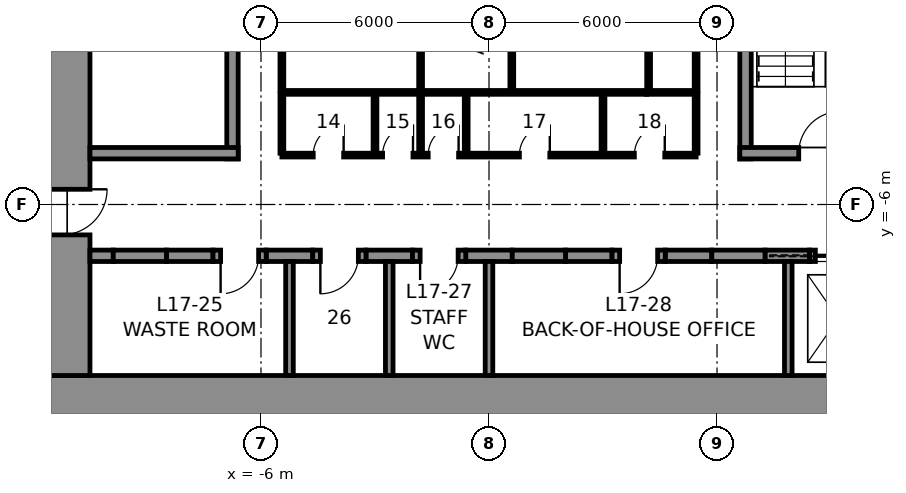
"""IFC4 building model, lengths in metres.
Left out: names, types, materials, properties, quantities, classifications, styles, units other than length and angle.
Written with IfcOpenShell. Run it as: python <this file> out.ifc"""

import sys

from ifc_helpers import new_model, si_unit, direction, frame, frame_2d, origin, place, context, subcontext, project, spatial, rectangle, extrude, element, fill, save


model = new_model("IFC4")
c1 = context("Model", 3, precision=1e-05, world=origin(), true_north=direction((0.0, 1.0)))
c2 = subcontext(c1, "Body", "Model", "MODEL_VIEW")
j1 = project(units=[si_unit("LENGTHUNIT", "METRE"), si_unit("PLANEANGLEUNIT", "RADIAN")], contexts=[c1])
p1 = place(None, origin())
s1 = spatial("IfcSite", under=j1, at=p1, CompositionType="ELEMENT")
p2 = place(p1, origin())
s2 = spatial("IfcBuilding", under=s1, at=p2, CompositionType="ELEMENT")
p3 = place(p2, frame((0.0, 0.0, 90.6)))
s3 = spatial("IfcBuildingStorey", under=s2, at=p3, CompositionType="ELEMENT", Elevation=90.6)
p4 = place(p3, frame((12.0, -11.25, 0.0), z_axis=(0.0, 0.0, 1.0), x_axis=(-1.0, 0.0, 0.0)))
e1 = element("IfcWall", 1, at=p4, inside=s3, PredefinedType="SHEAR", context=c2, shape_type="SweptSolid", body=[
    extrude(rectangle(XDim=24.0, YDim=1.5, at=frame_2d((12.0, 0.0))), origin(), (0.0, 0.0, 1.0), 4.6),
])
p5 = place(p3, frame((-11.25, -10.5, 0.0), z_axis=(0.0, 0.0, 1.0), x_axis=(0.0, 1.0, 0.0)))
e2 = element("IfcWall", 2, at=p5, inside=s3, PredefinedType="SHEAR", context=c2, shape_type="SweptSolid", body=[
    extrude(rectangle(XDim=21.0, YDim=1.5, at=frame_2d((10.5, 0.0))), origin(), (0.0, 0.0, 1.0), 4.6),
])
p6 = place(p5, frame((16.1, 0.0, 0.0)))
e3 = element("IfcOpeningElement", 3, at=p6, cuts=e2, PredefinedType="OPENING", context=c2, shape_type="SweptSolid", body=[
    extrude(rectangle(XDim=1.2, YDim=2.3, at=frame_2d((0.6, 1.15))), frame((0.0, 0.76, 0.0), z_axis=(0.0, -1.0, 0.0), x_axis=(1.0, 0.0, 0.0)), (0.0, 0.0, 1.0), 1.52),
])
p7 = place(p5, frame((3.7, 0.0, 0.0)))
e4 = element("IfcOpeningElement", 4, at=p7, cuts=e2, PredefinedType="OPENING", context=c2, shape_type="SweptSolid", body=[
    extrude(rectangle(XDim=1.2, YDim=2.3, at=frame_2d((0.6, 1.15))), frame((0.0, 0.76, 0.0), z_axis=(0.0, -1.0, 0.0), x_axis=(1.0, 0.0, 0.0)), (0.0, 0.0, 1.0), 1.52),
])
p8 = place(p3, frame((-10.5, -7.35, 0.0), z_axis=(0.0, 0.0, 1.0), x_axis=(1.0, 0.0, 0.0)))
e5 = element("IfcWall", 5, at=p8, inside=s3, PredefinedType="SHEAR", context=c2, shape_type="SweptSolid", body=[
    extrude(rectangle(XDim=0.613, YDim=0.3, at=frame_2d((0.306, 0.0))), origin(), (0.0, 0.0, 1.0), 4.6),
])
for number, where, z_axis, x_axis in (
    (6, (-8.488, -7.35, 0.0), (0.0, 0.0, 1.0), (1.0, 0.0, 0.0)),
    (7, (-5.863, -7.35, 0.0), (0.0, 0.0, 1.0), (1.0, 0.0, 0.0)),
    (8, (-3.238, -7.35, 0.0), (0.0, 0.0, 1.0), (1.0, 0.0, 0.0)),
    (9, (-0.613, -7.35, 0.0), (0.0, 0.0, 1.0), (1.0, 0.0, 0.0)),
    (10, (2.012, -7.35, 0.0), (0.0, 0.0, 1.0), (1.0, 0.0, 0.0)),
    (11, (4.637, -7.35, 0.0), (0.0, 0.0, 1.0), (1.0, 0.0, 0.0)),
):
    element("IfcWall", number, at=place(p3, frame(where, z_axis=z_axis, x_axis=x_axis)), inside=s3, PredefinedType="SHEAR", context=c2, shape_type="SweptSolid", body=[
        extrude(rectangle(XDim=1.225, YDim=0.3, at=frame_2d((0.613, 0.0))), origin(), (0.0, 0.0, 1.0), 4.6),
    ])
p9 = place(p3, frame((7.262, -7.35, 0.0), z_axis=(0.0, 0.0, 1.0), x_axis=(1.0, 0.0, 0.0)))
e12 = element("IfcWall", 12, at=p9, inside=s3, PredefinedType="SHEAR", context=c2, shape_type="SweptSolid", body=[
    extrude(rectangle(XDim=1.175, YDim=0.3, at=frame_2d((0.587, 0.0))), origin(), (0.0, 0.0, 1.0), 4.6),
])
p10 = place(p3, frame((-9.887, -7.35, 0.0), z_axis=(0.0, 0.0, 1.0), x_axis=(1.0, 0.0, 0.0)))
e13 = element("IfcWall", 13, at=p10, inside=s3, PredefinedType="PARTITIONING", context=c2, shape_type="SweptSolid", body=[
    extrude(rectangle(XDim=1.4, YDim=0.3, at=frame_2d((0.7, 0.0))), origin(), (0.0, 0.0, 1.0), 4.6),
])
p11 = place(p3, frame((-7.262, -7.35, 0.0), z_axis=(0.0, 0.0, 1.0), x_axis=(1.0, 0.0, 0.0)))
e14 = element("IfcWall", 14, at=p11, inside=s3, PredefinedType="PARTITIONING", context=c2, shape_type="SweptSolid", body=[
    extrude(rectangle(XDim=1.4, YDim=0.3, at=frame_2d((0.7, 0.0))), origin(), (0.0, 0.0, 1.0), 4.6),
])
p12 = place(p11, frame((0.2, 0.0, 0.0)))
e15 = element("IfcOpeningElement", 15, at=p12, cuts=e14, PredefinedType="OPENING", context=c2, shape_type="SweptSolid", body=[
    extrude(rectangle(XDim=1.0, YDim=2.3, at=frame_2d((0.5, 1.15))), frame((0.0, 0.16, 0.0), z_axis=(0.0, -1.0, 0.0), x_axis=(1.0, 0.0, 0.0)), (0.0, 0.0, 1.0), 0.32),
])
p13 = place(p3, frame((-4.637, -7.35, 0.0), z_axis=(0.0, 0.0, 1.0), x_axis=(1.0, 0.0, 0.0)))
e16 = element("IfcWall", 16, at=p13, inside=s3, PredefinedType="PARTITIONING", context=c2, shape_type="SweptSolid", body=[
    extrude(rectangle(XDim=1.4, YDim=0.3, at=frame_2d((0.7, 0.0))), origin(), (0.0, 0.0, 1.0), 4.6),
])
p14 = place(p13, frame((0.2, 0.0, 0.0)))
e17 = element("IfcOpeningElement", 17, at=p14, cuts=e16, PredefinedType="OPENING", context=c2, shape_type="SweptSolid", body=[
    extrude(rectangle(XDim=1.0, YDim=2.3, at=frame_2d((0.5, 1.15))), frame((0.0, 0.16, 0.0), z_axis=(0.0, -1.0, 0.0), x_axis=(1.0, 0.0, 0.0)), (0.0, 0.0, 1.0), 0.32),
])
p15 = place(p3, frame((-2.012, -7.35, 0.0), z_axis=(0.0, 0.0, 1.0), x_axis=(1.0, 0.0, 0.0)))
e18 = element("IfcWall", 18, at=p15, inside=s3, PredefinedType="PARTITIONING", context=c2, shape_type="SweptSolid", body=[
    extrude(rectangle(XDim=1.4, YDim=0.3, at=frame_2d((0.7, 0.0))), origin(), (0.0, 0.0, 1.0), 4.6),
])
p16 = place(p15, frame((0.2, 0.0, 0.0)))
e19 = element("IfcOpeningElement", 19, at=p16, cuts=e18, PredefinedType="OPENING", context=c2, shape_type="SweptSolid", body=[
    extrude(rectangle(XDim=1.0, YDim=2.3, at=frame_2d((0.5, 1.15))), frame((0.0, 0.16, 0.0), z_axis=(0.0, -1.0, 0.0), x_axis=(1.0, 0.0, 0.0)), (0.0, 0.0, 1.0), 0.32),
])
p17 = place(p3, frame((0.613, -7.35, 0.0), z_axis=(0.0, 0.0, 1.0), x_axis=(1.0, 0.0, 0.0)))
e20 = element("IfcWall", 20, at=p17, inside=s3, PredefinedType="PARTITIONING", context=c2, shape_type="SweptSolid", body=[
    extrude(rectangle(XDim=1.4, YDim=0.3, at=frame_2d((0.7, 0.0))), origin(), (0.0, 0.0, 1.0), 4.6),
])
p18 = place(p3, frame((3.238, -7.35, 0.0), z_axis=(0.0, 0.0, 1.0), x_axis=(1.0, 0.0, 0.0)))
e21 = element("IfcWall", 21, at=p18, inside=s3, PredefinedType="PARTITIONING", context=c2, shape_type="SweptSolid", body=[
    extrude(rectangle(XDim=1.4, YDim=0.3, at=frame_2d((0.7, 0.0))), origin(), (0.0, 0.0, 1.0), 4.6),
])
p19 = place(p18, frame((0.2, 0.0, 0.0)))
e22 = element("IfcOpeningElement", 22, at=p19, cuts=e21, PredefinedType="OPENING", context=c2, shape_type="SweptSolid", body=[
    extrude(rectangle(XDim=1.0, YDim=2.3, at=frame_2d((0.5, 1.15))), frame((0.0, 0.16, 0.0), z_axis=(0.0, -1.0, 0.0), x_axis=(1.0, 0.0, 0.0)), (0.0, 0.0, 1.0), 0.32),
])
p20 = place(p3, frame((5.863, -7.35, 0.0), z_axis=(0.0, 0.0, 1.0), x_axis=(1.0, 0.0, 0.0)))
e23 = element("IfcWall", 23, at=p20, inside=s3, PredefinedType="PARTITIONING", context=c2, shape_type="SweptSolid", body=[
    extrude(rectangle(XDim=1.4, YDim=0.3, at=frame_2d((0.7, 0.0))), origin(), (0.0, 0.0, 1.0), 4.6),
])
p21 = place(p3, frame((8.438, -7.35, 0.0), z_axis=(0.0, 0.0, 1.0), x_axis=(1.0, 0.0, 0.0)))
e24 = element("IfcWall", 24, at=p21, inside=s3, PredefinedType="PARTITIONING", context=c2, shape_type="SweptSolid", body=[
    extrude(rectangle(XDim=1.5, YDim=0.3, at=frame_2d((0.75, 0.0))), origin(), (0.0, 0.0, 1.0), 4.6),
])
p22 = place(p21, frame((0.15, 0.0, 0.0)))
e25 = element("IfcOpeningElement", 25, at=p22, cuts=e24, PredefinedType="OPENING", context=c2, shape_type="SweptSolid", body=[
    extrude(rectangle(XDim=1.2, YDim=2.3, at=frame_2d((0.6, 1.15))), frame((0.0, 0.16, 0.0), z_axis=(0.0, -1.0, 0.0), x_axis=(1.0, 0.0, 0.0)), (0.0, 0.0, 1.0), 0.32),
])
for number, where, z_axis, x_axis in (
    (26, (-5.25, -10.5, 0.0), (0.0, 0.0, 1.0), (0.0, 1.0, 0.0)),
    (27, (-2.625, -10.5, 0.0), (0.0, 0.0, 1.0), (0.0, 1.0, 0.0)),
    (28, (0.0, -10.5, 0.0), (0.0, 0.0, 1.0), (0.0, 1.0, 0.0)),
    (29, (7.875, -10.5, 0.0), (0.0, 0.0, 1.0), (0.0, 1.0, 0.0)),
):
    element("IfcWall", number, at=place(p3, frame(where, z_axis=z_axis, x_axis=x_axis)), inside=s3, PredefinedType="PARTITIONING", context=c2, shape_type="SweptSolid", body=[
        extrude(rectangle(XDim=3.0, YDim=0.2, at=frame_2d((1.5, 0.0))), origin(), (0.0, 0.0, 1.0), 4.6),
    ])
p23 = place(p3, frame((-6.75, -4.8, 0.0), z_axis=(0.0, 0.0, 1.0), x_axis=(0.0, 1.0, 0.0)))
e30 = element("IfcWall", 30, at=p23, inside=s3, PredefinedType="SOLIDWALL", context=c2, shape_type="SweptSolid", body=[
    extrude(rectangle(XDim=9.6, YDim=0.3, at=frame_2d((4.8, 0.0))), origin(), (0.0, 0.0, 1.0), 4.35),
])
p24 = place(p3, frame((-6.6, -4.65, 0.0), z_axis=(0.0, 0.0, 1.0), x_axis=(-1.0, 0.0, 0.0)))
e31 = element("IfcWall", 31, at=p24, inside=s3, PredefinedType="SOLIDWALL", context=c2, shape_type="SweptSolid", body=[
    extrude(rectangle(XDim=3.9, YDim=0.3, at=frame_2d((1.95, 0.0))), origin(), (0.0, 0.0, 1.0), 4.35),
])
p25 = place(p3, frame((6.75, -4.8, 0.0), z_axis=(0.0, 0.0, 1.0), x_axis=(0.0, 1.0, 0.0)))
e32 = element("IfcWall", 32, at=p25, inside=s3, PredefinedType="SOLIDWALL", context=c2, shape_type="SweptSolid", body=[
    extrude(rectangle(XDim=9.6, YDim=0.3, at=frame_2d((4.8, 0.0))), origin(), (0.0, 0.0, 1.0), 4.35),
])
p26 = place(p3, frame((10.5, -4.65, 0.0), z_axis=(0.0, 0.0, 1.0), x_axis=(-1.0, 0.0, 0.0)))
e33 = element("IfcWall", 33, at=p26, inside=s3, PredefinedType="SOLIDWALL", context=c2, shape_type="SweptSolid", body=[
    extrude(rectangle(XDim=3.9, YDim=0.3, at=frame_2d((1.95, 0.0))), origin(), (0.0, 0.0, 1.0), 4.35),
])
p27 = place(p26, frame((1.25, 0.0, 0.0)))
e34 = element("IfcOpeningElement", 34, at=p27, cuts=e33, PredefinedType="OPENING", context=c2, shape_type="SweptSolid", body=[
    extrude(rectangle(XDim=1.1, YDim=2.3, at=frame_2d((0.55, 1.15))), frame((0.0, 0.16, 0.0), z_axis=(0.0, -1.0, 0.0), x_axis=(1.0, 0.0, 0.0)), (0.0, 0.0, 1.0), 0.32),
])
p28 = place(p3, frame((4.15, -3.05, 0.0), z_axis=(0.0, 0.0, 1.0), x_axis=(-1.0, 0.0, 0.0)))
e35 = element("IfcWall", 35, at=p28, inside=s3, PredefinedType="PARTITIONING", context=c2, shape_type="SweptSolid", body=[
    extrude(rectangle(XDim=9.6, YDim=0.1, at=frame_2d((4.8, 0.0))), origin(), (0.0, 0.0, 1.0), 4.35),
])
p29 = place(p3, frame((5.45, -3.05, 0.0), z_axis=(0.0, 0.0, 1.0), x_axis=(-1.0, 0.0, 0.0)))
e36 = element("IfcWall", 36, at=p29, inside=s3, PredefinedType="PARTITIONING", context=c2, shape_type="SweptSolid", body=[
    extrude(rectangle(XDim=1.3, YDim=0.1, at=frame_2d((0.65, 0.0))), origin(), (0.0, 0.0, 1.0), 4.35),
])
for number, where, z_axis, x_axis in (
    (37, (5.45, 3.0, 0.0), (0.0, 0.0, 1.0), (0.0, -1.0, 0.0)),
    (38, (-5.45, -3.0, 0.0), (0.0, 0.0, 1.0), (0.0, 1.0, 0.0)),
    (39, (-1.8, -3.0, 0.0), (0.0, 0.0, 1.0), (0.0, 1.0, 0.0)),
    (40, (0.6, -3.0, 0.0), (0.0, 0.0, 1.0), (0.0, 1.0, 0.0)),
    (41, (4.2, -3.0, 0.0), (0.0, 0.0, 1.0), (0.0, 1.0, 0.0)),
):
    element("IfcWall", number, at=place(p3, frame(where, z_axis=z_axis, x_axis=x_axis)), inside=s3, PredefinedType="PARTITIONING", context=c2, shape_type="SweptSolid", body=[
        extrude(rectangle(XDim=6.0, YDim=0.1, at=frame_2d((3.0, 0.0))), origin(), (0.0, 0.0, 1.0), 4.35),
    ])
p30 = place(p3, frame((5.45, -4.7, 0.0), z_axis=(0.0, 0.0, 1.0), x_axis=(-1.0, 0.0, 0.0)))
e42 = element("IfcWall", 42, at=p30, inside=s3, PredefinedType="PARTITIONING", context=c2, shape_type="SweptSolid", body=[
    extrude(rectangle(XDim=10.9, YDim=0.1, at=frame_2d((5.45, 0.0))), origin(), (0.0, 0.0, 1.0), 4.35),
])
p31 = place(p30, frame((9.275, 0.0, 0.0)))
e43 = element("IfcOpeningElement", 43, at=p31, cuts=e42, PredefinedType="OPENING", context=c2, shape_type="SweptSolid", body=[
    extrude(rectangle(XDim=0.8, YDim=2.3, at=frame_2d((0.4, 1.15))), frame((0.0, 0.06, 0.0), z_axis=(0.0, -1.0, 0.0), x_axis=(1.0, 0.0, 0.0)), (0.0, 0.0, 1.0), 0.12),
])
p32 = place(p30, frame((7.45, 0.0, 0.0)))
e44 = element("IfcOpeningElement", 44, at=p32, cuts=e42, PredefinedType="OPENING", context=c2, shape_type="SweptSolid", body=[
    extrude(rectangle(XDim=0.8, YDim=2.3, at=frame_2d((0.4, 1.15))), frame((0.0, 0.06, 0.0), z_axis=(0.0, -1.0, 0.0), x_axis=(1.0, 0.0, 0.0)), (0.0, 0.0, 1.0), 0.12),
])
p33 = place(p30, frame((6.25, 0.0, 0.0)))
e45 = element("IfcOpeningElement", 45, at=p33, cuts=e42, PredefinedType="OPENING", context=c2, shape_type="SweptSolid", body=[
    extrude(rectangle(XDim=0.8, YDim=2.3, at=frame_2d((0.4, 1.15))), frame((0.0, 0.06, 0.0), z_axis=(0.0, -1.0, 0.0), x_axis=(1.0, 0.0, 0.0)), (0.0, 0.0, 1.0), 0.12),
])
p34 = place(p30, frame((3.85, 0.0, 0.0)))
e46 = element("IfcOpeningElement", 46, at=p34, cuts=e42, PredefinedType="OPENING", context=c2, shape_type="SweptSolid", body=[
    extrude(rectangle(XDim=0.8, YDim=2.3, at=frame_2d((0.4, 1.15))), frame((0.0, 0.06, 0.0), z_axis=(0.0, -1.0, 0.0), x_axis=(1.0, 0.0, 0.0)), (0.0, 0.0, 1.0), 0.12),
])
p35 = place(p30, frame((0.825, 0.0, 0.0)))
e47 = element("IfcOpeningElement", 47, at=p35, cuts=e42, PredefinedType="OPENING", context=c2, shape_type="SweptSolid", body=[
    extrude(rectangle(XDim=0.8, YDim=2.3, at=frame_2d((0.4, 1.15))), frame((0.0, 0.06, 0.0), z_axis=(0.0, -1.0, 0.0), x_axis=(1.0, 0.0, 0.0)), (0.0, 0.0, 1.0), 0.12),
])
for number, where, z_axis, x_axis in (
    (48, (-5.45, -3.1, 0.0), (0.0, 0.0, 1.0), (0.0, -1.0, 0.0)),
    (49, (5.45, -3.1, 0.0), (0.0, 0.0, 1.0), (0.0, -1.0, 0.0)),
    (50, (-3.0, -3.1, 0.0), (0.0, 0.0, 1.0), (0.0, -1.0, 0.0)),
    (51, (-1.8, -3.1, 0.0), (0.0, 0.0, 1.0), (0.0, -1.0, 0.0)),
    (52, (-0.6, -3.1, 0.0), (0.0, 0.0, 1.0), (0.0, -1.0, 0.0)),
    (53, (3.0, -3.1, 0.0), (0.0, 0.0, 1.0), (0.0, -1.0, 0.0)),
):
    element("IfcWall", number, at=place(p3, frame(where, z_axis=z_axis, x_axis=x_axis)), inside=s3, PredefinedType="PARTITIONING", context=c2, shape_type="SweptSolid", body=[
        extrude(rectangle(XDim=1.55, YDim=0.1, at=frame_2d((0.775, 0.0))), origin(), (0.0, 0.0, 1.0), 4.35),
    ])
p36 = place(p27, frame((1.1, 0.0, 0.0), z_axis=(0.0, 0.0, 1.0), x_axis=(-1.0, 0.0, 0.0)))
e54 = element("IfcDoor", 54, at=p36, inside=s3, OperationType="SINGLE_SWING_RIGHT", PredefinedType="DOOR", context=c2, shape_type="SweptSolid", body=[
    extrude(rectangle(XDim=1.1, YDim=2.3, at=frame_2d((0.55, 1.15))), frame((0.0, 0.025, 0.0), z_axis=(0.0, -1.0, 0.0), x_axis=(1.0, 0.0, 0.0)), (0.0, 0.0, 1.0), 0.05),
])
fill(e34, e54)
p37 = place(p31, frame((0.8, 0.0, 0.0), z_axis=(0.0, 0.0, 1.0), x_axis=(-1.0, 0.0, 0.0)))
e55 = element("IfcDoor", 55, at=p37, inside=s3, OperationType="SINGLE_SWING_RIGHT", PredefinedType="DOOR", context=c2, shape_type="SweptSolid", body=[
    extrude(rectangle(XDim=0.8, YDim=2.3, at=frame_2d((0.4, 1.15))), frame((0.0, 0.025, 0.0), z_axis=(0.0, -1.0, 0.0), x_axis=(1.0, 0.0, 0.0)), (0.0, 0.0, 1.0), 0.05),
])
fill(e43, e55)
p38 = place(p32, frame((0.8, 0.0, 0.0), z_axis=(0.0, 0.0, 1.0), x_axis=(-1.0, 0.0, 0.0)))
e56 = element("IfcDoor", 56, at=p38, inside=s3, OperationType="SINGLE_SWING_RIGHT", PredefinedType="DOOR", context=c2, shape_type="SweptSolid", body=[
    extrude(rectangle(XDim=0.8, YDim=2.3, at=frame_2d((0.4, 1.15))), frame((0.0, 0.025, 0.0), z_axis=(0.0, -1.0, 0.0), x_axis=(1.0, 0.0, 0.0)), (0.0, 0.0, 1.0), 0.05),
])
fill(e44, e56)
p39 = place(p33, frame((0.8, 0.0, 0.0), z_axis=(0.0, 0.0, 1.0), x_axis=(-1.0, 0.0, 0.0)))
e57 = element("IfcDoor", 57, at=p39, inside=s3, OperationType="SINGLE_SWING_RIGHT", PredefinedType="DOOR", context=c2, shape_type="SweptSolid", body=[
    extrude(rectangle(XDim=0.8, YDim=2.3, at=frame_2d((0.4, 1.15))), frame((0.0, 0.025, 0.0), z_axis=(0.0, -1.0, 0.0), x_axis=(1.0, 0.0, 0.0)), (0.0, 0.0, 1.0), 0.05),
])
fill(e45, e57)
p40 = place(p34, frame((0.8, 0.0, 0.0), z_axis=(0.0, 0.0, 1.0), x_axis=(-1.0, 0.0, 0.0)))
e58 = element("IfcDoor", 58, at=p40, inside=s3, OperationType="SINGLE_SWING_RIGHT", PredefinedType="DOOR", context=c2, shape_type="SweptSolid", body=[
    extrude(rectangle(XDim=0.8, YDim=2.3, at=frame_2d((0.4, 1.15))), frame((0.0, 0.025, 0.0), z_axis=(0.0, -1.0, 0.0), x_axis=(1.0, 0.0, 0.0)), (0.0, 0.0, 1.0), 0.05),
])
fill(e46, e58)
p41 = place(p35, frame((0.8, 0.0, 0.0), z_axis=(0.0, 0.0, 1.0), x_axis=(-1.0, 0.0, 0.0)))
e59 = element("IfcDoor", 59, at=p41, inside=s3, OperationType="SINGLE_SWING_RIGHT", PredefinedType="DOOR", context=c2, shape_type="SweptSolid", body=[
    extrude(rectangle(XDim=0.8, YDim=2.3, at=frame_2d((0.4, 1.15))), frame((0.0, 0.025, 0.0), z_axis=(0.0, -1.0, 0.0), x_axis=(1.0, 0.0, 0.0)), (0.0, 0.0, 1.0), 0.05),
])
fill(e47, e59)
p42 = place(p12, frame((1.0, 0.0, 0.0), z_axis=(0.0, 0.0, 1.0), x_axis=(-1.0, 0.0, 0.0)))
e60 = element("IfcDoor", 60, at=p42, inside=s3, OperationType="SINGLE_SWING_RIGHT", PredefinedType="DOOR", context=c2, shape_type="SweptSolid", body=[
    extrude(rectangle(XDim=1.0, YDim=2.3, at=frame_2d((0.5, 1.15))), frame((0.0, 0.025, 0.0), z_axis=(0.0, -1.0, 0.0), x_axis=(1.0, 0.0, 0.0)), (0.0, 0.0, 1.0), 0.05),
])
fill(e15, e60)
p43 = place(p14, frame((1.0, 0.0, 0.0), z_axis=(0.0, 0.0, 1.0), x_axis=(-1.0, 0.0, 0.0)))
e61 = element("IfcDoor", 61, at=p43, inside=s3, OperationType="SINGLE_SWING_RIGHT", PredefinedType="DOOR", context=c2, shape_type="SweptSolid", body=[
    extrude(rectangle(XDim=1.0, YDim=2.3, at=frame_2d((0.5, 1.15))), frame((0.0, 0.025, 0.0), z_axis=(0.0, -1.0, 0.0), x_axis=(1.0, 0.0, 0.0)), (0.0, 0.0, 1.0), 0.05),
])
fill(e17, e61)
p44 = place(p16, frame((1.0, 0.0, 0.0), z_axis=(0.0, 0.0, 1.0), x_axis=(-1.0, 0.0, 0.0)))
e62 = element("IfcDoor", 62, at=p44, inside=s3, OperationType="SINGLE_SWING_RIGHT", PredefinedType="DOOR", context=c2, shape_type="SweptSolid", body=[
    extrude(rectangle(XDim=1.0, YDim=2.3, at=frame_2d((0.5, 1.15))), frame((0.0, 0.025, 0.0), z_axis=(0.0, -1.0, 0.0), x_axis=(1.0, 0.0, 0.0)), (0.0, 0.0, 1.0), 0.05),
])
fill(e19, e62)
p45 = place(p19, frame((1.0, 0.0, 0.0), z_axis=(0.0, 0.0, 1.0), x_axis=(-1.0, 0.0, 0.0)))
e63 = element("IfcDoor", 63, at=p45, inside=s3, OperationType="SINGLE_SWING_RIGHT", PredefinedType="DOOR", context=c2, shape_type="SweptSolid", body=[
    extrude(rectangle(XDim=1.0, YDim=2.3, at=frame_2d((0.5, 1.15))), frame((0.0, 0.025, 0.0), z_axis=(0.0, -1.0, 0.0), x_axis=(1.0, 0.0, 0.0)), (0.0, 0.0, 1.0), 0.05),
])
fill(e22, e63)
p46 = place(p7, frame((1.2, 0.0, 0.0), z_axis=(0.0, 0.0, 1.0), x_axis=(-1.0, 0.0, 0.0)))
e64 = element("IfcDoor", 64, at=p46, inside=s3, OperationType="SINGLE_SWING_LEFT", PredefinedType="DOOR", context=c2, shape_type="SweptSolid", body=[
    extrude(rectangle(XDim=1.2, YDim=2.3, at=frame_2d((0.6, 1.15))), frame((0.0, 0.025, 0.0), z_axis=(0.0, -1.0, 0.0), x_axis=(1.0, 0.0, 0.0)), (0.0, 0.0, 1.0), 0.05),
])
fill(e4, e64)
p47 = place(p22, origin())
e65 = element("IfcDoor", 65, at=p47, inside=s3, OperationType="SLIDING_TO_LEFT", PredefinedType="DOOR", context=c2, shape_type="SweptSolid", body=[
    extrude(rectangle(XDim=1.2, YDim=2.3, at=frame_2d((0.6, 1.15))), frame((0.0, 0.025, 0.0), z_axis=(0.0, -1.0, 0.0), x_axis=(1.0, 0.0, 0.0)), (0.0, 0.0, 1.0), 0.05),
])
fill(e25, e65)
save(model, sys.argv[1])
